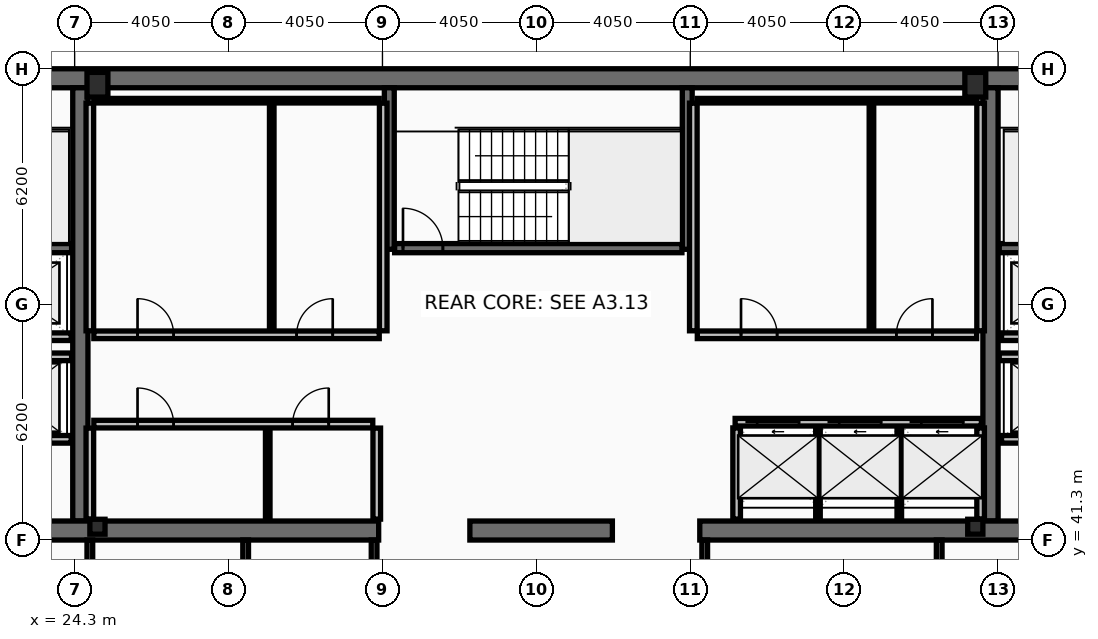
"""IFC4 building model, lengths in metres.
Left out: names, types, materials, properties, quantities, classifications, styles, units other than length and angle.
Written with IfcOpenShell. Run it as: python <this file> out.ifc"""

import sys

from ifc_helpers import new_model, si_unit, direction, frame, frame_2d, origin, origin_2d, place, context, subcontext, project, spatial, rectangle, hollow_rectangle, i_section, extrude, element, fill, save


model = new_model("IFC4")
c1 = context("Model", 3, precision=1e-05, world=origin(), true_north=direction((0.0, 1.0)))
c2 = subcontext(c1, "Body", "Model", "MODEL_VIEW")
j1 = project(units=[si_unit("LENGTHUNIT", "METRE"), si_unit("PLANEANGLEUNIT", "RADIAN")], contexts=[c1])
p1 = place(None, origin())
s1 = spatial("IfcSite", under=j1, at=p1, CompositionType="ELEMENT")
p2 = place(p1, origin())
s2 = spatial("IfcBuilding", under=s1, at=p2, CompositionType="ELEMENT")
p3 = place(p2, frame((0.0, 0.0, 298.6)))
s3 = spatial("IfcBuildingStorey", under=s2, at=p3, CompositionType="ELEMENT", Elevation=298.6)
p4 = place(p3, frame((16.2, 53.45, 0.0), z_axis=(0.0, 0.0, 1.0), x_axis=(1.0, 0.0, 0.0)))
e1 = element("IfcWall", 1, at=p4, inside=s3, PredefinedType="SHEAR", context=c2, shape_type="SweptSolid", body=[
    extrude(rectangle(XDim=40.5, YDim=0.5, at=frame_2d((20.25, 0.0))), origin(), (0.0, 0.0, 1.0), 3.44),
])
for number, where, z_axis, x_axis in (
    (2, (24.45, 41.8, 0.0), (0.0, 0.0, 1.0), (0.0, 1.0, 0.0)),
    (3, (48.4, 41.8, 0.0), (0.0, 0.0, 1.0), (0.0, 1.0, 0.0)),
):
    element("IfcWall", number, at=place(p3, frame(where, z_axis=z_axis, x_axis=x_axis)), inside=s3, PredefinedType="SHEAR", context=c2, shape_type="SweptSolid", body=[
        extrude(rectangle(XDim=11.4, YDim=0.4, at=frame_2d((5.7, 0.0))), origin(), (0.0, 0.0, 1.0), 3.44),
    ])
p5 = place(p3, frame((32.3, 41.55, 0.0), z_axis=(0.0, 0.0, 1.0), x_axis=(-1.0, 0.0, 0.0)))
e4 = element("IfcWall", 4, at=p5, inside=s3, PredefinedType="SHEAR", context=c2, shape_type="SweptSolid", body=[
    extrude(rectangle(XDim=11.45, YDim=0.5, at=frame_2d((5.725, 0.0))), origin(), (0.0, 0.0, 1.0), 3.44),
])
p6 = place(p3, frame((38.45, 41.55, 0.0), z_axis=(0.0, 0.0, 1.0), x_axis=(-1.0, 0.0, 0.0)))
e5 = element("IfcWall", 5, at=p6, inside=s3, PredefinedType="SHEAR", context=c2, shape_type="SweptSolid", body=[
    extrude(rectangle(XDim=3.75, YDim=0.5, at=frame_2d((1.875, 0.0))), origin(), (0.0, 0.0, 1.0), 3.44),
])
p7 = place(p3, frame((52.05, 41.55, 0.0), z_axis=(0.0, 0.0, 1.0), x_axis=(-1.0, 0.0, 0.0)))
e6 = element("IfcWall", 6, at=p7, inside=s3, PredefinedType="SHEAR", context=c2, shape_type="SweptSolid", body=[
    extrude(rectangle(XDim=11.3, YDim=0.5, at=frame_2d((5.65, 0.0))), origin(), (0.0, 0.0, 1.0), 3.44),
])
for number, where, z_axis, x_axis in (
    (7, (32.58, 48.95, 0.0), (0.0, 0.0, 1.0), (0.0, 1.0, 0.0)),
    (8, (40.42, 48.95, 0.0), (0.0, 0.0, 1.0), (0.0, 1.0, 0.0)),
):
    element("IfcWall", number, at=place(p3, frame(where, z_axis=z_axis, x_axis=x_axis)), inside=s3, PredefinedType="SHEAR", context=c2, shape_type="SweptSolid", body=[
        extrude(rectangle(XDim=4.25, YDim=0.26, at=frame_2d((2.125, 0.0))), origin(), (0.0, 0.0, 1.0), 3.44),
    ])
p8 = place(p3, frame((16.7, 48.98, 0.0), z_axis=(0.0, 0.0, 1.0), x_axis=(1.0, 0.0, 0.0)))
e9 = element("IfcWall", 9, at=p8, inside=s3, PredefinedType="SHEAR", context=c2, shape_type="SweptSolid", body=[
    extrude(rectangle(XDim=7.52, YDim=0.24, at=frame_2d((3.76, 0.0))), origin(), (0.0, 0.0, 1.0), 3.44),
])
p9 = place(p8, frame((0.22, 0.0, 0.0)))
e10 = element("IfcOpeningElement", 10, at=p9, cuts=e9, PredefinedType="OPENING", context=c2, shape_type="SweptSolid", body=[
    extrude(rectangle(XDim=1.05, YDim=2.15, at=frame_2d((0.525, 1.075))), frame((0.0, 0.13, 0.0), z_axis=(0.0, -1.0, 0.0), x_axis=(1.0, 0.0, 0.0)), (0.0, 0.0, 1.0), 0.26),
])
p10 = place(p3, frame((48.63, 48.98, 0.0), z_axis=(0.0, 0.0, 1.0), x_axis=(1.0, 0.0, 0.0)))
e11 = element("IfcWall", 11, at=p10, inside=s3, PredefinedType="SHEAR", context=c2, shape_type="SweptSolid", body=[
    extrude(rectangle(XDim=7.57, YDim=0.24, at=frame_2d((3.785, 0.0))), origin(), (0.0, 0.0, 1.0), 3.44),
])
p11 = place(p10, frame((6.3, 0.0, 0.0)))
e12 = element("IfcOpeningElement", 12, at=p11, cuts=e11, PredefinedType="OPENING", context=c2, shape_type="SweptSolid", body=[
    extrude(rectangle(XDim=1.05, YDim=2.15, at=frame_2d((0.525, 1.075))), frame((0.0, 0.13, 0.0), z_axis=(0.0, -1.0, 0.0), x_axis=(1.0, 0.0, 0.0)), (0.0, 0.0, 1.0), 0.26),
])
p12 = place(p3, frame((32.72, 48.98, 0.0), z_axis=(0.0, 0.0, 1.0), x_axis=(1.0, 0.0, 0.0)))
e13 = element("IfcWall", 13, at=p12, inside=s3, PredefinedType="SHEAR", context=c2, shape_type="SweptSolid", body=[
    extrude(rectangle(XDim=7.56, YDim=0.24, at=frame_2d((3.78, 0.0))), origin(), (0.0, 0.0, 1.0), 3.44),
])
p13 = place(p12, frame((0.22, 0.0, 0.0)))
e14 = element("IfcOpeningElement", 14, at=p13, cuts=e13, PredefinedType="OPENING", context=c2, shape_type="SweptSolid", body=[
    extrude(rectangle(XDim=1.05, YDim=2.15, at=frame_2d((0.525, 1.075))), frame((0.0, 0.13, 0.0), z_axis=(0.0, -1.0, 0.0), x_axis=(1.0, 0.0, 0.0)), (0.0, 0.0, 1.0), 0.26),
])
for number, where, z_axis, x_axis in (
    (15, (24.9, 53.28, 0.0), (0.0, 0.0, 1.0), (1.0, 0.0, 0.0)),
    (16, (48.0, 53.28, 0.0), (0.0, 0.0, 1.0), (1.0, 0.0, 0.0)),
):
    element("IfcColumn", number, at=place(p3, frame(where, z_axis=z_axis, x_axis=x_axis)), inside=s3, PredefinedType="COLUMN", context=c2, shape_type="SweptSolid", body=[
        extrude(hollow_rectangle(XDim=0.55, YDim=0.65, WallThickness=0.04, at=origin_2d()), origin(), (0.0, 0.0, 1.0), 3.6),
    ])
for number, where, z_axis, x_axis in (
    (17, (24.9, 41.65, 0.0), (0.0, 0.0, 1.0), (1.0, 0.0, 0.0)),
    (18, (48.0, 41.65, 0.0), (0.0, 0.0, 1.0), (1.0, 0.0, 0.0)),
):
    element("IfcColumn", number, at=place(p3, frame(where, z_axis=z_axis, x_axis=x_axis)), inside=s3, PredefinedType="COLUMN", context=c2, shape_type="SweptSolid", body=[
        extrude(i_section(OverallWidth=0.399, OverallDepth=0.393, WebThickness=0.023, FlangeThickness=0.037, at=origin_2d()), origin(), (0.0, 0.0, 1.0), 3.6),
    ])
p14 = place(p3, frame((41.68, 44.4, 0.0), z_axis=(0.0, 0.0, 1.0), x_axis=(1.0, 0.0, 0.0)))
e19 = element("IfcWall", 19, at=p14, inside=s3, PredefinedType="PARTITIONING", context=c2, shape_type="SweptSolid", body=[
    extrude(rectangle(XDim=6.48, YDim=0.2, at=frame_2d((3.24, 0.0))), origin(), (0.0, 0.0, 1.0), 3.44),
])
p15 = place(p14, frame((0.58, 0.0, 0.0)))
e20 = element("IfcOpeningElement", 20, at=p15, cuts=e19, PredefinedType="OPENING", context=c2, shape_type="SweptSolid", body=[
    extrude(rectangle(XDim=1.1, YDim=2.18, at=frame_2d((0.55, 1.09))), frame((0.0, 0.11, 0.0), z_axis=(0.0, -1.0, 0.0), x_axis=(1.0, 0.0, 0.0)), (0.0, 0.0, 1.0), 0.22),
])
p16 = place(p14, frame((2.74, 0.0, 0.0)))
e21 = element("IfcOpeningElement", 21, at=p16, cuts=e19, PredefinedType="OPENING", context=c2, shape_type="SweptSolid", body=[
    extrude(rectangle(XDim=1.1, YDim=2.18, at=frame_2d((0.55, 1.09))), frame((0.0, 0.11, 0.0), z_axis=(0.0, -1.0, 0.0), x_axis=(1.0, 0.0, 0.0)), (0.0, 0.0, 1.0), 0.22),
])
p17 = place(p14, frame((4.9, 0.0, 0.0)))
e22 = element("IfcOpeningElement", 22, at=p17, cuts=e19, PredefinedType="OPENING", context=c2, shape_type="SweptSolid", body=[
    extrude(rectangle(XDim=1.1, YDim=2.18, at=frame_2d((0.55, 1.09))), frame((0.0, 0.11, 0.0), z_axis=(0.0, -1.0, 0.0), x_axis=(1.0, 0.0, 0.0)), (0.0, 0.0, 1.0), 0.22),
])
p18 = place(p3, frame((51.61, 43.95, 0.0), z_axis=(0.0, 0.0, 1.0), x_axis=(-1.0, 0.0, 0.0)))
e23 = element("IfcWall", 23, at=p18, inside=s3, PredefinedType="PARTITIONING", context=c2, shape_type="SweptSolid", body=[
    extrude(rectangle(XDim=2.92, YDim=0.2, at=frame_2d((1.46, 0.0))), origin(), (0.0, 0.0, 1.0), 3.44),
])
p19 = place(p18, frame((0.81, 0.0, 0.0)))
e24 = element("IfcOpeningElement", 24, at=p19, cuts=e23, PredefinedType="OPENING", context=c2, shape_type="SweptSolid", body=[
    extrude(rectangle(XDim=1.3, YDim=2.18, at=frame_2d((0.65, 1.09))), frame((0.0, 0.11, 0.0), z_axis=(0.0, -1.0, 0.0), x_axis=(1.0, 0.0, 0.0)), (0.0, 0.0, 1.0), 0.22),
])
p20 = place(p3, frame((24.21, 43.95, 0.0), z_axis=(0.0, 0.0, 1.0), x_axis=(-1.0, 0.0, 0.0)))
e25 = element("IfcWall", 25, at=p20, inside=s3, PredefinedType="PARTITIONING", context=c2, shape_type="SweptSolid", body=[
    extrude(rectangle(XDim=2.97, YDim=0.2, at=frame_2d((1.485, 0.0))), origin(), (0.0, 0.0, 1.0), 3.44),
])
p21 = place(p20, frame((0.86, 0.0, 0.0)))
e26 = element("IfcOpeningElement", 26, at=p21, cuts=e25, PredefinedType="OPENING", context=c2, shape_type="SweptSolid", body=[
    extrude(rectangle(XDim=1.3, YDim=2.18, at=frame_2d((0.65, 1.09))), frame((0.0, 0.11, 0.0), z_axis=(0.0, -1.0, 0.0), x_axis=(1.0, 0.0, 0.0)), (0.0, 0.0, 1.0), 0.22),
])
p22 = place(p3, frame((51.61, 46.65, 0.0), z_axis=(0.0, 0.0, 1.0), x_axis=(-1.0, 0.0, 0.0)))
e27 = element("IfcWall", 27, at=p22, inside=s3, PredefinedType="PARTITIONING", context=c2, shape_type="SweptSolid", body=[
    extrude(rectangle(XDim=2.92, YDim=0.2, at=frame_2d((1.46, 0.0))), origin(), (0.0, 0.0, 1.0), 3.44),
])
p23 = place(p22, frame((0.86, 0.0, 0.0)))
e28 = element("IfcOpeningElement", 28, at=p23, cuts=e27, PredefinedType="OPENING", context=c2, shape_type="SweptSolid", body=[
    extrude(rectangle(XDim=1.2, YDim=2.18, at=frame_2d((0.6, 1.09))), frame((0.0, 0.11, 0.0), z_axis=(0.0, -1.0, 0.0), x_axis=(1.0, 0.0, 0.0)), (0.0, 0.0, 1.0), 0.22),
])
p24 = place(p3, frame((24.21, 46.65, 0.0), z_axis=(0.0, 0.0, 1.0), x_axis=(-1.0, 0.0, 0.0)))
e29 = element("IfcWall", 29, at=p24, inside=s3, PredefinedType="PARTITIONING", context=c2, shape_type="SweptSolid", body=[
    extrude(rectangle(XDim=2.97, YDim=0.2, at=frame_2d((1.485, 0.0))), origin(), (0.0, 0.0, 1.0), 3.44),
])
p25 = place(p24, frame((0.91, 0.0, 0.0)))
e30 = element("IfcOpeningElement", 30, at=p25, cuts=e29, PredefinedType="OPENING", context=c2, shape_type="SweptSolid", body=[
    extrude(rectangle(XDim=1.2, YDim=2.18, at=frame_2d((0.6, 1.09))), frame((0.0, 0.11, 0.0), z_axis=(0.0, -1.0, 0.0), x_axis=(1.0, 0.0, 0.0)), (0.0, 0.0, 1.0), 0.22),
])
p26 = place(p3, frame((21.2, 46.12, 0.0), z_axis=(0.0, 0.0, 1.0), x_axis=(1.0, 0.0, 0.0)))
e31 = element("IfcWall", 31, at=p26, inside=s3, PredefinedType="PARTITIONING", context=c2, shape_type="SweptSolid", body=[
    extrude(rectangle(XDim=3.02, YDim=0.2, at=frame_2d((1.51, 0.0))), origin(), (0.0, 0.0, 1.0), 3.44),
])
p27 = place(p3, frame((48.63, 46.12, 0.0), z_axis=(0.0, 0.0, 1.0), x_axis=(1.0, 0.0, 0.0)))
e32 = element("IfcWall", 32, at=p27, inside=s3, PredefinedType="PARTITIONING", context=c2, shape_type="SweptSolid", body=[
    extrude(rectangle(XDim=3.07, YDim=0.2, at=frame_2d((1.535, 0.0))), origin(), (0.0, 0.0, 1.0), 3.44),
])
for number, where, z_axis, x_axis in (
    (33, (24.7, 46.805, 0.0), (0.0, 0.0, 1.0), (0.0, 1.0, 0.0)),
    (34, (32.42, 46.805, 0.0), (0.0, 0.0, 1.0), (0.0, 1.0, 0.0)),
):
    element("IfcWall", number, at=place(p3, frame(where, z_axis=z_axis, x_axis=x_axis)), inside=s3, PredefinedType="PARTITIONING", context=c2, shape_type="SweptSolid", body=[
        extrude(rectangle(XDim=5.99, YDim=0.2, at=frame_2d((2.995, 0.0))), origin(), (0.0, 0.0, 1.0), 3.44),
    ])
p28 = place(p3, frame((24.805, 52.86, 0.0), z_axis=(0.0, 0.0, 1.0), x_axis=(1.0, 0.0, 0.0)))
e35 = element("IfcWall", 35, at=p28, inside=s3, PredefinedType="PARTITIONING", context=c2, shape_type="SweptSolid", body=[
    extrude(rectangle(XDim=7.51, YDim=0.12, at=frame_2d((3.755, 0.0))), origin(), (0.0, 0.0, 1.0), 3.44),
])
p29 = place(p3, frame((29.486, 46.805, 0.0), z_axis=(0.0, 0.0, 1.0), x_axis=(0.0, 1.0, 0.0)))
e36 = element("IfcWall", 36, at=p29, inside=s3, PredefinedType="PARTITIONING", context=c2, shape_type="SweptSolid", body=[
    extrude(rectangle(XDim=5.99, YDim=0.12, at=frame_2d((2.995, 0.0))), origin(), (0.0, 0.0, 1.0), 3.44),
])
p30 = place(p3, frame((24.805, 46.7, 0.0), z_axis=(0.0, 0.0, 1.0), x_axis=(1.0, 0.0, 0.0)))
e37 = element("IfcWall", 37, at=p30, inside=s3, PredefinedType="PARTITIONING", context=c2, shape_type="SweptSolid", body=[
    extrude(rectangle(XDim=7.51, YDim=0.2, at=frame_2d((3.755, 0.0))), origin(), (0.0, 0.0, 1.0), 3.44),
])
p31 = place(p30, frame((1.15, 0.0, 0.0)))
e38 = element("IfcOpeningElement", 38, at=p31, cuts=e37, PredefinedType="OPENING", context=c2, shape_type="SweptSolid", body=[
    extrude(rectangle(XDim=0.95, YDim=2.1, at=frame_2d((0.475, 1.05))), frame((0.0, 0.11, 0.0), z_axis=(0.0, -1.0, 0.0), x_axis=(1.0, 0.0, 0.0)), (0.0, 0.0, 1.0), 0.22),
])
p32 = place(p30, frame((5.336, 0.0, 0.0)))
e39 = element("IfcOpeningElement", 39, at=p32, cuts=e37, PredefinedType="OPENING", context=c2, shape_type="SweptSolid", body=[
    extrude(rectangle(XDim=0.95, YDim=2.1, at=frame_2d((0.475, 1.05))), frame((0.0, 0.11, 0.0), z_axis=(0.0, -1.0, 0.0), x_axis=(1.0, 0.0, 0.0)), (0.0, 0.0, 1.0), 0.22),
])
for number, where, z_axis, x_axis in (
    (40, (24.7, 41.85, 0.0), (0.0, 0.0, 1.0), (0.0, 1.0, 0.0)),
    (41, (32.25, 41.85, 0.0), (0.0, 0.0, 1.0), (0.0, 1.0, 0.0)),
):
    element("IfcWall", number, at=place(p3, frame(where, z_axis=z_axis, x_axis=x_axis)), inside=s3, PredefinedType="PARTITIONING", context=c2, shape_type="SweptSolid", body=[
        extrude(rectangle(XDim=2.395, YDim=0.2, at=frame_2d((1.198, 0.0))), origin(), (0.0, 0.0, 1.0), 3.44),
    ])
p33 = place(p3, frame((29.381, 41.85, 0.0), z_axis=(0.0, 0.0, 1.0), x_axis=(0.0, 1.0, 0.0)))
e42 = element("IfcWall", 42, at=p33, inside=s3, PredefinedType="PARTITIONING", context=c2, shape_type="SweptSolid", body=[
    extrude(rectangle(XDim=2.395, YDim=0.12, at=frame_2d((1.198, 0.0))), origin(), (0.0, 0.0, 1.0), 3.44),
])
p34 = place(p3, frame((24.805, 44.35, 0.0), z_axis=(0.0, 0.0, 1.0), x_axis=(1.0, 0.0, 0.0)))
e43 = element("IfcWall", 43, at=p34, inside=s3, PredefinedType="PARTITIONING", context=c2, shape_type="SweptSolid", body=[
    extrude(rectangle(XDim=7.34, YDim=0.2, at=frame_2d((3.67, 0.0))), origin(), (0.0, 0.0, 1.0), 3.44),
])
p35 = place(p34, frame((1.15, 0.0, 0.0)))
e44 = element("IfcOpeningElement", 44, at=p35, cuts=e43, PredefinedType="OPENING", context=c2, shape_type="SweptSolid", body=[
    extrude(rectangle(XDim=0.95, YDim=2.1, at=frame_2d((0.475, 1.05))), frame((0.0, 0.11, 0.0), z_axis=(0.0, -1.0, 0.0), x_axis=(1.0, 0.0, 0.0)), (0.0, 0.0, 1.0), 0.22),
])
p36 = place(p34, frame((5.231, 0.0, 0.0)))
e45 = element("IfcOpeningElement", 45, at=p36, cuts=e43, PredefinedType="OPENING", context=c2, shape_type="SweptSolid", body=[
    extrude(rectangle(XDim=0.95, YDim=2.1, at=frame_2d((0.475, 1.05))), frame((0.0, 0.11, 0.0), z_axis=(0.0, -1.0, 0.0), x_axis=(1.0, 0.0, 0.0)), (0.0, 0.0, 1.0), 0.22),
])
for number, where, z_axis, x_axis in (
    (46, (40.58, 46.805, 0.0), (0.0, 0.0, 1.0), (0.0, 1.0, 0.0)),
    (47, (48.14, 46.805, 0.0), (0.0, 0.0, 1.0), (0.0, 1.0, 0.0)),
):
    element("IfcWall", number, at=place(p3, frame(where, z_axis=z_axis, x_axis=x_axis)), inside=s3, PredefinedType="PARTITIONING", context=c2, shape_type="SweptSolid", body=[
        extrude(rectangle(XDim=5.99, YDim=0.2, at=frame_2d((2.995, 0.0))), origin(), (0.0, 0.0, 1.0), 3.44),
    ])
p37 = place(p3, frame((40.685, 52.86, 0.0), z_axis=(0.0, 0.0, 1.0), x_axis=(1.0, 0.0, 0.0)))
e48 = element("IfcWall", 48, at=p37, inside=s3, PredefinedType="PARTITIONING", context=c2, shape_type="SweptSolid", body=[
    extrude(rectangle(XDim=7.35, YDim=0.12, at=frame_2d((3.675, 0.0))), origin(), (0.0, 0.0, 1.0), 3.44),
])
p38 = place(p3, frame((45.267, 46.805, 0.0), z_axis=(0.0, 0.0, 1.0), x_axis=(0.0, 1.0, 0.0)))
e49 = element("IfcWall", 49, at=p38, inside=s3, PredefinedType="PARTITIONING", context=c2, shape_type="SweptSolid", body=[
    extrude(rectangle(XDim=5.99, YDim=0.12, at=frame_2d((2.995, 0.0))), origin(), (0.0, 0.0, 1.0), 3.44),
])
p39 = place(p3, frame((40.685, 46.7, 0.0), z_axis=(0.0, 0.0, 1.0), x_axis=(1.0, 0.0, 0.0)))
e50 = element("IfcWall", 50, at=p39, inside=s3, PredefinedType="PARTITIONING", context=c2, shape_type="SweptSolid", body=[
    extrude(rectangle(XDim=7.35, YDim=0.2, at=frame_2d((3.675, 0.0))), origin(), (0.0, 0.0, 1.0), 3.44),
])
p40 = place(p39, frame((1.15, 0.0, 0.0)))
e51 = element("IfcOpeningElement", 51, at=p40, cuts=e50, PredefinedType="OPENING", context=c2, shape_type="SweptSolid", body=[
    extrude(rectangle(XDim=0.95, YDim=2.1, at=frame_2d((0.475, 1.05))), frame((0.0, 0.11, 0.0), z_axis=(0.0, -1.0, 0.0), x_axis=(1.0, 0.0, 0.0)), (0.0, 0.0, 1.0), 0.22),
])
p41 = place(p39, frame((5.237, 0.0, 0.0)))
e52 = element("IfcOpeningElement", 52, at=p41, cuts=e50, PredefinedType="OPENING", context=c2, shape_type="SweptSolid", body=[
    extrude(rectangle(XDim=0.95, YDim=2.1, at=frame_2d((0.475, 1.05))), frame((0.0, 0.11, 0.0), z_axis=(0.0, -1.0, 0.0), x_axis=(1.0, 0.0, 0.0)), (0.0, 0.0, 1.0), 0.22),
])
for number, where, z_axis, x_axis in (
    (53, (41.72, 41.85, 0.0), (0.0, 0.0, 1.0), (0.0, 1.0, 0.0)),
    (54, (48.14, 41.85, 0.0), (0.0, 0.0, 1.0), (0.0, 1.0, 0.0)),
):
    element("IfcWall", number, at=place(p3, frame(where, z_axis=z_axis, x_axis=x_axis)), inside=s3, PredefinedType="PARTITIONING", context=c2, shape_type="SweptSolid", body=[
        extrude(rectangle(XDim=2.4, YDim=0.2, at=frame_2d((1.2, 0.0))), origin(), (0.0, 0.0, 1.0), 3.44),
    ])
for number, where, z_axis, x_axis in (
    (55, (43.86, 41.85, 0.0), (0.0, 0.0, 1.0), (0.0, 1.0, 0.0)),
    (56, (46.0, 41.85, 0.0), (0.0, 0.0, 1.0), (0.0, 1.0, 0.0)),
):
    element("IfcWall", number, at=place(p3, frame(where, z_axis=z_axis, x_axis=x_axis)), inside=s3, PredefinedType="PARTITIONING", context=c2, shape_type="SweptSolid", body=[
        extrude(rectangle(XDim=2.4, YDim=0.12, at=frame_2d((1.2, 0.0))), origin(), (0.0, 0.0, 1.0), 3.44),
    ])
p42 = place(p3, frame((24.7, 38.28, 0.0), z_axis=(0.0, 0.0, 1.0), x_axis=(0.0, 1.0, 0.0)))
e57 = element("IfcWall", 57, at=p42, inside=s3, PredefinedType="PARTITIONING", context=c2, shape_type="SweptSolid", body=[
    extrude(rectangle(XDim=3.02, YDim=0.15, at=frame_2d((1.51, 0.0))), origin(), (0.0, 0.0, 1.0), 2.78),
])
for number, where, z_axis, x_axis in (
    (58, (28.8, 38.28, 0.0), (0.0, 0.0, 1.0), (0.0, 1.0, 0.0)),
    (59, (32.18, 38.28, 0.0), (0.0, 0.0, 1.0), (0.0, 1.0, 0.0)),
    (60, (40.88, 38.28, 0.0), (0.0, 0.0, 1.0), (0.0, 1.0, 0.0)),
    (61, (47.05, 38.28, 0.0), (0.0, 0.0, 1.0), (0.0, 1.0, 0.0)),
):
    element("IfcWall", number, at=place(p3, frame(where, z_axis=z_axis, x_axis=x_axis)), inside=s3, PredefinedType="PARTITIONING", context=c2, shape_type="SweptSolid", body=[
        extrude(rectangle(XDim=3.02, YDim=0.15, at=frame_2d((1.51, 0.0))), origin(), (0.0, 0.0, 1.0), 3.44),
    ])
p43 = place(p13, origin())
e62 = element("IfcDoor", 62, at=p43, inside=s3, OperationType="SINGLE_SWING_LEFT", PredefinedType="DOOR", context=c2, shape_type="SweptSolid", body=[
    extrude(rectangle(XDim=1.05, YDim=2.15, at=frame_2d((0.525, 1.075))), frame((0.0, 0.025, 0.0), z_axis=(0.0, -1.0, 0.0), x_axis=(1.0, 0.0, 0.0)), (0.0, 0.0, 1.0), 0.05),
])
fill(e14, e62)
p44 = place(p15, origin())
e63 = element("IfcDoor", 63, at=p44, inside=s3, OperationType="SLIDING_TO_LEFT", PredefinedType="DOOR", context=c2, shape_type="SweptSolid", body=[
    extrude(rectangle(XDim=1.1, YDim=2.18, at=frame_2d((0.55, 1.09))), frame((0.0, 0.025, 0.0), z_axis=(0.0, -1.0, 0.0), x_axis=(1.0, 0.0, 0.0)), (0.0, 0.0, 1.0), 0.05),
])
fill(e20, e63)
p45 = place(p16, origin())
e64 = element("IfcDoor", 64, at=p45, inside=s3, OperationType="SLIDING_TO_LEFT", PredefinedType="DOOR", context=c2, shape_type="SweptSolid", body=[
    extrude(rectangle(XDim=1.1, YDim=2.18, at=frame_2d((0.55, 1.09))), frame((0.0, 0.025, 0.0), z_axis=(0.0, -1.0, 0.0), x_axis=(1.0, 0.0, 0.0)), (0.0, 0.0, 1.0), 0.05),
])
fill(e21, e64)
p46 = place(p17, origin())
e65 = element("IfcDoor", 65, at=p46, inside=s3, OperationType="SLIDING_TO_LEFT", PredefinedType="DOOR", context=c2, shape_type="SweptSolid", body=[
    extrude(rectangle(XDim=1.1, YDim=2.18, at=frame_2d((0.55, 1.09))), frame((0.0, 0.025, 0.0), z_axis=(0.0, -1.0, 0.0), x_axis=(1.0, 0.0, 0.0)), (0.0, 0.0, 1.0), 0.05),
])
fill(e22, e65)
p47 = place(p31, origin())
e66 = element("IfcDoor", 66, at=p47, inside=s3, OperationType="SINGLE_SWING_LEFT", PredefinedType="DOOR", context=c2, shape_type="SweptSolid", body=[
    extrude(rectangle(XDim=0.95, YDim=2.1, at=frame_2d((0.475, 1.05))), frame((0.0, 0.025, 0.0), z_axis=(0.0, -1.0, 0.0), x_axis=(1.0, 0.0, 0.0)), (0.0, 0.0, 1.0), 0.05),
])
fill(e38, e66)
p48 = place(p32, origin())
e67 = element("IfcDoor", 67, at=p48, inside=s3, OperationType="SINGLE_SWING_RIGHT", PredefinedType="DOOR", context=c2, shape_type="SweptSolid", body=[
    extrude(rectangle(XDim=0.95, YDim=2.1, at=frame_2d((0.475, 1.05))), frame((0.0, 0.025, 0.0), z_axis=(0.0, -1.0, 0.0), x_axis=(1.0, 0.0, 0.0)), (0.0, 0.0, 1.0), 0.05),
])
fill(e39, e67)
p49 = place(p35, origin())
e68 = element("IfcDoor", 68, at=p49, inside=s3, OperationType="SINGLE_SWING_LEFT", PredefinedType="DOOR", context=c2, shape_type="SweptSolid", body=[
    extrude(rectangle(XDim=0.95, YDim=2.1, at=frame_2d((0.475, 1.05))), frame((0.0, 0.025, 0.0), z_axis=(0.0, -1.0, 0.0), x_axis=(1.0, 0.0, 0.0)), (0.0, 0.0, 1.0), 0.05),
])
fill(e44, e68)
p50 = place(p36, origin())
e69 = element("IfcDoor", 69, at=p50, inside=s3, OperationType="SINGLE_SWING_RIGHT", PredefinedType="DOOR", context=c2, shape_type="SweptSolid", body=[
    extrude(rectangle(XDim=0.95, YDim=2.1, at=frame_2d((0.475, 1.05))), frame((0.0, 0.025, 0.0), z_axis=(0.0, -1.0, 0.0), x_axis=(1.0, 0.0, 0.0)), (0.0, 0.0, 1.0), 0.05),
])
fill(e45, e69)
p51 = place(p40, origin())
e70 = element("IfcDoor", 70, at=p51, inside=s3, OperationType="SINGLE_SWING_LEFT", PredefinedType="DOOR", context=c2, shape_type="SweptSolid", body=[
    extrude(rectangle(XDim=0.95, YDim=2.1, at=frame_2d((0.475, 1.05))), frame((0.0, 0.025, 0.0), z_axis=(0.0, -1.0, 0.0), x_axis=(1.0, 0.0, 0.0)), (0.0, 0.0, 1.0), 0.05),
])
fill(e51, e70)
p52 = place(p41, origin())
e71 = element("IfcDoor", 71, at=p52, inside=s3, OperationType="SINGLE_SWING_RIGHT", PredefinedType="DOOR", context=c2, shape_type="SweptSolid", body=[
    extrude(rectangle(XDim=0.95, YDim=2.1, at=frame_2d((0.475, 1.05))), frame((0.0, 0.025, 0.0), z_axis=(0.0, -1.0, 0.0), x_axis=(1.0, 0.0, 0.0)), (0.0, 0.0, 1.0), 0.05),
])
fill(e52, e71)
save(model, sys.argv[1])
